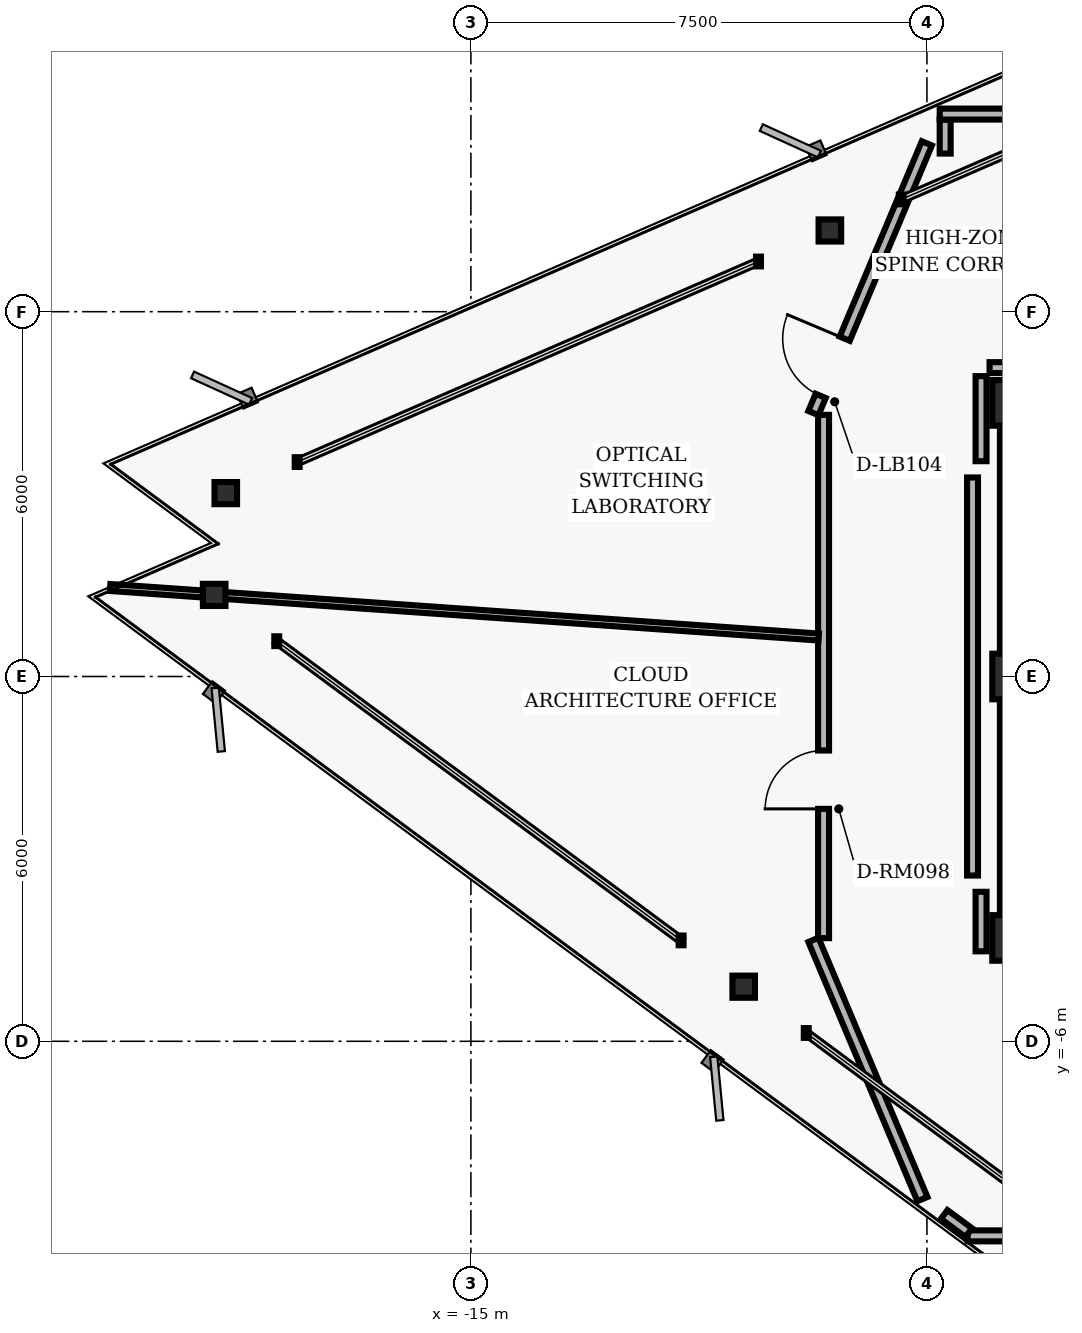
"""IFC4 building model, lengths in metres.
Left out: names, types, materials, properties, quantities, classifications, styles, units other than length and angle.
Written with IfcOpenShell. Run it as: python <this file> out.ifc"""

import sys

from ifc_helpers import new_model, si_unit, direction, frame, frame_2d, origin, origin_2d, place, context, subcontext, project, spatial, rectangle, hollow_rectangle, i_section, extrude, element, fill, save


model = new_model("IFC4")
c1 = context("Model", 3, precision=1e-05, world=origin(), true_north=direction((0.0, 1.0)))
c2 = subcontext(c1, "Body", "Model", "MODEL_VIEW")
j1 = project(units=[si_unit("LENGTHUNIT", "METRE"), si_unit("PLANEANGLEUNIT", "RADIAN")], contexts=[c1])
p1 = place(None, origin())
s1 = spatial("IfcSite", under=j1, at=p1, CompositionType="ELEMENT")
p2 = place(p1, origin())
s2 = spatial("IfcBuilding", under=s1, at=p2, CompositionType="ELEMENT")
p3 = place(p2, frame((0.0, 0.0, 233.12)))
s3 = spatial("IfcBuildingStorey", under=s2, at=p3, CompositionType="ELEMENT", Elevation=233.12)
for number, where, z_axis, x_axis in (
    (1, (-6.05, 4.5, 0.0), (0.0, 0.0, 1.0), (1.0, 0.0, 0.0)),
    (2, (-6.05, 0.0, 0.0), (0.0, 0.0, 1.0), (1.0, 0.0, 0.0)),
    (3, (-6.05, -4.3, 0.0), (0.0, 0.0, 1.0), (1.0, 0.0, 0.0)),
):
    element("IfcColumn", number, at=place(p3, frame(where, z_axis=z_axis, x_axis=x_axis)), inside=s3, PredefinedType="COLUMN", context=c2, shape_type="SweptSolid", body=[
        extrude(hollow_rectangle(XDim=0.75, YDim=0.75, WallThickness=0.05, InnerFilletRadius=0.02, OuterFilletRadius=0.04, at=origin_2d()), origin(), (0.0, 0.0, 1.0), 3.04),
    ])
p4 = place(p3, frame((-6.05, 0.375, 0.0), z_axis=(0.0, 0.0, 1.0), x_axis=(0.0, 1.0, 0.0)))
e4 = element("IfcWall", 4, at=p4, inside=s3, PredefinedType="SHEAR", context=c2, shape_type="SweptSolid", body=[
    extrude(rectangle(XDim=3.75, YDim=0.5, at=frame_2d((1.875, 0.0))), origin(), (0.0, 0.0, 1.0), 2.798),
])
p5 = place(p3, frame((-6.05, -3.925, 0.0), z_axis=(0.0, 0.0, 1.0), x_axis=(0.0, 1.0, 0.0)))
e5 = element("IfcWall", 5, at=p5, inside=s3, PredefinedType="SHEAR", context=c2, shape_type="SweptSolid", body=[
    extrude(rectangle(XDim=3.55, YDim=0.5, at=frame_2d((1.775, 0.0))), origin(), (0.0, 0.0, 1.0), 2.798),
])
for number, where, z_axis, x_axis in (
    (6, (-9.096, 7.336, 0.0), (0.0, 0.0, 1.0), (1.0, 0.0, 0.0)),
    (7, (-19.031, 3.016, 0.0), (0.0, 0.0, 1.0), (1.0, 0.0, 0.0)),
    (8, (-19.222, 1.342, 0.0), (0.0, 0.0, 1.0), (1.0, 0.0, 0.0)),
    (9, (-10.513, -5.102, 0.0), (0.0, 0.0, 1.0), (1.0, 0.0, 0.0)),
):
    element("IfcColumn", number, at=place(p3, frame(where, z_axis=z_axis, x_axis=x_axis)), inside=s3, PredefinedType="COLUMN", context=c2, shape_type="SweptSolid", body=[
        extrude(i_section(OverallWidth=0.371, OverallDepth=0.364, WebThickness=0.013, FlangeThickness=0.022, FilletRadius=0.015, at=origin_2d()), origin(), (0.0, 0.0, 1.0), 3.04),
    ])
p6 = place(p3, frame((-7.574, -8.596, 0.0), z_axis=(0.0, 0.0, 1.0), x_axis=(-0.38757793583, 0.921836939842, 0.0)))
e10 = element("IfcWall", 10, at=p6, inside=s3, PredefinedType="PARTITIONING", context=c2, shape_type="SweptSolid", body=[
    extrude(rectangle(XDim=4.625, YDim=0.18, at=frame_2d((2.313, 0.0))), origin(), (0.0, 0.0, 1.0), 2.773),
])
p7 = place(p3, frame((-9.2, -4.303, 0.0), z_axis=(0.0, 0.0, 1.0), x_axis=(0.0, 1.0, 0.0)))
e11 = element("IfcWall", 11, at=p7, inside=s3, PredefinedType="PARTITIONING", context=c2, shape_type="SweptSolid", body=[
    extrude(rectangle(XDim=8.607, YDim=0.18, at=frame_2d((4.303, 0.0))), origin(), (0.0, 0.0, 1.0), 2.773),
])
p8 = place(p7, frame((2.126, 0.0, 0.0)))
e12 = element("IfcOpeningElement", 12, at=p8, cuts=e11, PredefinedType="OPENING", context=c2, shape_type="SweptSolid", body=[
    extrude(rectangle(XDim=0.96, YDim=2.02, at=frame_2d((0.48, 1.01))), frame((0.0, 0.1, 0.0), z_axis=(0.0, -1.0, 0.0), x_axis=(1.0, 0.0, 0.0)), (0.0, 0.0, 1.0), 0.2),
])
p9 = place(p3, frame((-9.367, 4.332, 0.0), z_axis=(0.0, 0.0, 1.0), x_axis=(0.387573945081, 0.921838617706, 0.0)))
e13 = element("IfcWall", 13, at=p9, inside=s3, PredefinedType="PARTITIONING", context=c2, shape_type="SweptSolid", body=[
    extrude(rectangle(XDim=4.813, YDim=0.18, at=frame_2d((2.407, 0.0))), origin(), (0.0, 0.0, 1.0), 2.773),
])
p10 = place(p9, frame((0.307, 0.0, 0.0)))
e14 = element("IfcOpeningElement", 14, at=p10, cuts=e13, PredefinedType="OPENING", context=c2, shape_type="SweptSolid", body=[
    extrude(rectangle(XDim=1.02, YDim=2.02, at=frame_2d((0.51, 1.01))), frame((0.0, 0.1, 0.0), z_axis=(0.0, -1.0, 0.0), x_axis=(1.0, 0.0, 0.0)), (0.0, 0.0, 1.0), 0.2),
])
p11 = place(p3, frame((-7.2, 8.601, 0.0), z_axis=(0.0, 0.0, 1.0), x_axis=(0.0, 1.0, 0.0)))
e15 = element("IfcWall", 15, at=p11, inside=s3, PredefinedType="PARTITIONING", context=c2, shape_type="SweptSolid", body=[
    extrude(rectangle(XDim=0.559, YDim=0.18, at=frame_2d((0.28, 0.0))), origin(), (0.0, 0.0, 1.0), 2.773),
])
p12 = place(p3, frame((-7.29, 9.25, 0.0), z_axis=(0.0, 0.0, 1.0), x_axis=(1.0, 0.0, 0.0)))
e16 = element("IfcWall", 16, at=p12, inside=s3, PredefinedType="PARTITIONING", context=c2, shape_type="SweptSolid", body=[
    extrude(rectangle(XDim=13.3, YDim=0.18, at=frame_2d((6.65, 0.0))), origin(), (0.0, 0.0, 1.0), 2.395),
])
p13 = place(p12, frame((8.17, 0.0, 0.0)))
e17 = element("IfcOpeningElement", 17, at=p13, cuts=e16, PredefinedType="OPENING", context=c2, shape_type="SweptSolid", body=[
    extrude(rectangle(XDim=0.96, YDim=2.02, at=frame_2d((0.48, 1.01))), frame((0.0, 0.1, 0.0), z_axis=(0.0, -1.0, 0.0), x_axis=(1.0, 0.0, 0.0)), (0.0, 0.0, 1.0), 0.2),
])
p14 = place(p3, frame((-5.881, 5.08, 0.0), z_axis=(0.0, 0.0, 1.0), x_axis=(-1.0, 0.0, 0.0)))
e18 = element("IfcWall", 18, at=p14, inside=s3, PredefinedType="PARTITIONING", context=c2, shape_type="SweptSolid", body=[
    extrude(rectangle(XDim=0.589, YDim=0.18, at=frame_2d((0.294, 0.0))), origin(), (0.0, 0.0, 1.0), 2.773),
])
p15 = place(p3, frame((-6.61, 4.94, 0.0), z_axis=(0.0, 0.0, 1.0), x_axis=(0.0, -1.0, 0.0)))
e19 = element("IfcWall", 19, at=p15, inside=s3, PredefinedType="PARTITIONING", context=c2, shape_type="SweptSolid", body=[
    extrude(rectangle(XDim=1.399, YDim=0.18, at=frame_2d((0.699, 0.0))), origin(), (0.0, 0.0, 1.0), 2.773),
])
p16 = place(p3, frame((-6.75, 3.273, 0.0), z_axis=(0.0, 0.0, 1.0), x_axis=(0.0, -1.0, 0.0)))
e20 = element("IfcWall", 20, at=p16, inside=s3, PredefinedType="PARTITIONING", context=c2, shape_type="SweptSolid", body=[
    extrude(rectangle(XDim=6.547, YDim=0.18, at=frame_2d((3.273, 0.0))), origin(), (0.0, 0.0, 1.0), 2.773),
])
p17 = place(p3, frame((-6.61, -3.541, 0.0), z_axis=(0.0, 0.0, 1.0), x_axis=(0.0, -1.0, 0.0)))
e21 = element("IfcWall", 21, at=p17, inside=s3, PredefinedType="PARTITIONING", context=c2, shape_type="SweptSolid", body=[
    extrude(rectangle(XDim=0.979, YDim=0.18, at=frame_2d((0.489, 0.0))), origin(), (0.0, 0.0, 1.0), 2.773),
])
p18 = place(p3, frame((6.01, -9.2, 0.0), z_axis=(0.0, 0.0, 1.0), x_axis=(-1.0, 0.0, 0.0)))
e22 = element("IfcWall", 22, at=p18, inside=s3, PredefinedType="PARTITIONING", context=c2, shape_type="SweptSolid", body=[
    extrude(rectangle(XDim=12.84, YDim=0.18, at=frame_2d((6.42, 0.0))), origin(), (0.0, 0.0, 1.0), 2.773),
])
p19 = place(p18, frame((5.124, 0.0, 0.0)))
e23 = element("IfcOpeningElement", 23, at=p19, cuts=e22, PredefinedType="OPENING", context=c2, shape_type="SweptSolid", body=[
    extrude(rectangle(XDim=0.96, YDim=2.02, at=frame_2d((0.48, 1.01))), frame((0.0, 0.1, 0.0), z_axis=(0.0, -1.0, 0.0), x_axis=(1.0, 0.0, 0.0)), (0.0, 0.0, 1.0), 0.2),
])
p20 = place(p3, frame((-6.812, -9.146, 0.0), z_axis=(0.0, 0.0, 1.0), x_axis=(-0.803893055119, 0.594773869577, 0.0)))
e24 = element("IfcWall", 24, at=p20, inside=s3, PredefinedType="PARTITIONING", context=c2, shape_type="SweptSolid", body=[
    extrude(rectangle(XDim=0.502, YDim=0.18, at=frame_2d((0.251, 0.0))), origin(), (0.0, 0.0, 1.0), 2.773),
])
p21 = place(p3, frame((-9.28, 0.649, 0.0), z_axis=(0.0, 0.0, 1.0), x_axis=(-0.997563579993, 0.069763198551, 0.0)))
e25 = element("IfcWall", 25, at=p21, inside=s3, PredefinedType="MOVABLE", context=c2, shape_type="SweptSolid", body=[
    extrude(rectangle(XDim=11.682, YDim=0.115, at=frame_2d((5.841, 0.0))), origin(), (0.0, 0.0, 1.0), 2.253),
])
p22 = place(p8, origin())
e26 = element("IfcDoor", 26, at=p22, inside=s3, OperationType="SINGLE_SWING_LEFT", PredefinedType="DOOR", context=c2, shape_type="SweptSolid", body=[
    extrude(rectangle(XDim=0.96, YDim=2.02, at=frame_2d((0.48, 1.01))), frame((0.0, 0.025, 0.0), z_axis=(0.0, -1.0, 0.0), x_axis=(1.0, 0.0, 0.0)), (0.0, 0.0, 1.0), 0.05),
])
fill(e12, e26)
p23 = place(p10, origin())
e27 = element("IfcDoor", 27, at=p23, inside=s3, OperationType="SINGLE_SWING_RIGHT", PredefinedType="DOOR", context=c2, shape_type="SweptSolid", body=[
    extrude(rectangle(XDim=1.02, YDim=2.02, at=frame_2d((0.51, 1.01))), frame((0.0, 0.025, 0.0), z_axis=(0.0, -1.0, 0.0), x_axis=(1.0, 0.0, 0.0)), (0.0, 0.0, 1.0), 0.05),
])
fill(e14, e27)
save(model, sys.argv[1])
